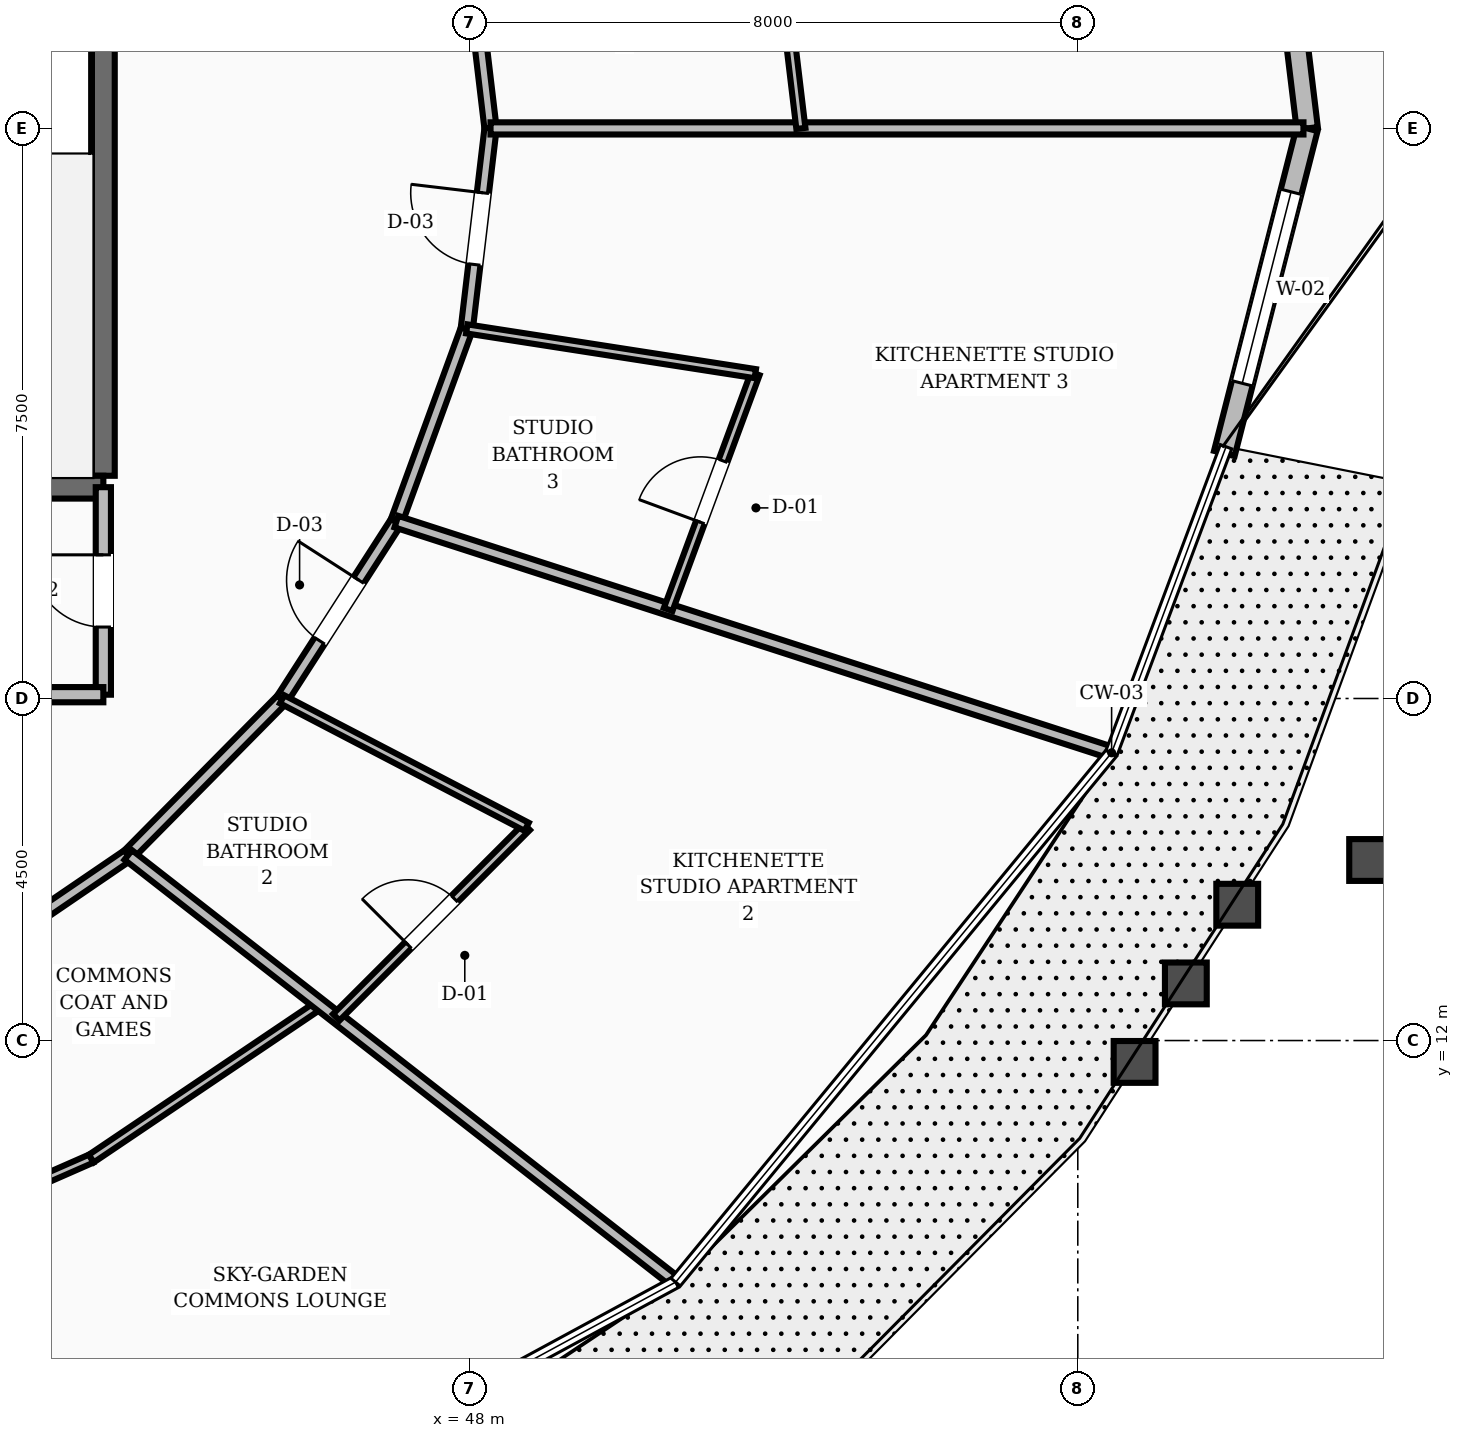
"""IFC4 building model, lengths in metres.
Left out: names, types, materials, properties, quantities, classifications, styles, units other than length and angle.
Written with IfcOpenShell. Run it as: python <this file> out.ifc"""

import sys

from ifc_helpers import new_model, si_unit, direction, frame, frame_2d, origin, place, context, subcontext, project, spatial, rectangle, extrude, element, fill, save


model = new_model("IFC4")
c1 = context("Model", 3, precision=1e-05, world=origin(), true_north=direction((0.0, 1.0)))
c2 = subcontext(c1, "Body", "Model", "MODEL_VIEW")
j1 = project(units=[si_unit("LENGTHUNIT", "METRE"), si_unit("PLANEANGLEUNIT", "RADIAN")], contexts=[c1])
p1 = place(None, origin())
s1 = spatial("IfcSite", under=j1, at=p1, CompositionType="ELEMENT")
p2 = place(p1, origin())
s2 = spatial("IfcBuilding", under=s1, at=p2, CompositionType="ELEMENT")
p3 = place(p2, frame((0.0, 0.0, 84.4)))
s3 = spatial("IfcBuildingStorey", under=s2, at=p3, CompositionType="ELEMENT", Elevation=84.4)
p4 = place(p3, frame((43.18, 19.43, 0.0), z_axis=(0.0, 0.0, 1.0), x_axis=(0.0, 1.0, 0.0)))
e1 = element("IfcWall", 1, at=p4, inside=s3, PredefinedType="SHEAR", context=c2, shape_type="SweptSolid", body=[
    extrude(rectangle(XDim=8.74, YDim=0.3, at=frame_2d((4.37, 0.0))), origin(), (0.0, 0.0, 1.0), 3.6),
])
p5 = place(p3, frame((39.58, 19.28, 0.0), z_axis=(0.0, 0.0, 1.0), x_axis=(1.0, 0.0, 0.0)))
e2 = element("IfcWall", 2, at=p5, inside=s3, PredefinedType="SHEAR", context=c2, shape_type="SweptSolid", body=[
    extrude(rectangle(XDim=3.6, YDim=0.3, at=frame_2d((1.8, 0.0))), origin(), (0.0, 0.0, 1.0), 3.6),
])
p6 = place(p3, frame((59.019, 24.0, 0.0), z_axis=(0.0, 0.0, 1.0), x_axis=(-0.119979283707, 0.99277639551, 0.0)))
e3 = element("IfcWall", 3, at=p6, inside=s3, PredefinedType="STANDARD", context=c2, shape_type="SweptSolid", body=[
    extrude(rectangle(XDim=4.328, YDim=0.28, at=frame_2d((2.164, 0.0))), origin(), (0.0, 0.0, 1.0), 2.71),
])
p7 = place(p3, frame((57.928, 19.723, 0.0), z_axis=(0.0, 0.0, 1.0), x_axis=(0.24719210279, 0.968966492877, 0.0)))
e4 = element("IfcWall", 4, at=p7, inside=s3, PredefinedType="STANDARD", context=c2, shape_type="SweptSolid", body=[
    extrude(rectangle(XDim=4.414, YDim=0.28, at=frame_2d((2.207, 0.0))), origin(), (0.0, 0.0, 1.0), 2.71),
])
p8 = place(p7, frame((0.953, 0.0, 0.8)))
e5 = element("IfcOpeningElement", 5, at=p8, cuts=e4, PredefinedType="OPENING", context=c2, shape_type="SweptSolid", body=[
    extrude(rectangle(XDim=2.6, YDim=1.65, at=frame_2d((1.3, 0.825))), frame((0.0, 0.15, 0.0), z_axis=(0.0, -1.0, 0.0), x_axis=(1.0, 0.0, 0.0)), (0.0, 0.0, 1.0), 0.3),
])
p9 = place(p3, frame((43.18, 16.55, 0.0), z_axis=(0.0, 0.0, 1.0), x_axis=(0.0, 1.0, 0.0)))
e6 = element("IfcWall", 6, at=p9, inside=s3, PredefinedType="SOLIDWALL", context=c2, shape_type="SweptSolid", body=[
    extrude(rectangle(XDim=2.73, YDim=0.2, at=frame_2d((1.365, 0.0))), origin(), (0.0, 0.0, 1.0), 2.71),
])
p10 = place(p9, frame((0.89, 0.0, 0.0)))
e7 = element("IfcOpeningElement", 7, at=p10, cuts=e6, PredefinedType="OPENING", context=c2, shape_type="SweptSolid", body=[
    extrude(rectangle(XDim=0.95, YDim=2.1, at=frame_2d((0.475, 1.05))), frame((0.0, 0.11, 0.0), z_axis=(0.0, -1.0, 0.0), x_axis=(1.0, 0.0, 0.0)), (0.0, 0.0, 1.0), 0.22),
])
p11 = place(p3, frame((39.2, 16.55, 0.0), z_axis=(0.0, 0.0, 1.0), x_axis=(1.0, 0.0, 0.0)))
e8 = element("IfcWall", 8, at=p11, inside=s3, PredefinedType="SOLIDWALL", context=c2, shape_type="SweptSolid", body=[
    extrude(rectangle(XDim=3.98, YDim=0.2, at=frame_2d((1.99, 0.0))), origin(), (0.0, 0.0, 1.0), 2.71),
])
p12 = place(p3, frame((48.274, 24.0, 0.0), z_axis=(0.0, 0.0, 1.0), x_axis=(-0.117763961213, 0.99304161516, 0.0)))
e9 = element("IfcWall", 9, at=p12, inside=s3, PredefinedType="SOLIDWALL", context=c2, shape_type="SweptSolid", body=[
    extrude(rectangle(XDim=2.656, YDim=0.16, at=frame_2d((1.328, 0.0))), origin(), (0.0, 0.0, 1.0), 2.71),
])
p13 = place(p3, frame((41.041, 12.76, 0.0), z_axis=(0.0, 0.0, 1.0), x_axis=(0.826293096206, 0.56324037423, 0.0)))
e10 = element("IfcWall", 10, at=p13, inside=s3, PredefinedType="SOLIDWALL", context=c2, shape_type="SweptSolid", body=[
    extrude(rectangle(XDim=2.985, YDim=0.16, at=frame_2d((1.492, 0.0))), origin(), (0.0, 0.0, 1.0), 2.71),
])
p14 = place(p3, frame((43.508, 14.441, 0.0), z_axis=(0.0, 0.0, 1.0), x_axis=(0.702811997, 0.711375636969, 0.0)))
e11 = element("IfcWall", 11, at=p14, inside=s3, PredefinedType="SOLIDWALL", context=c2, shape_type="SweptSolid", body=[
    extrude(rectangle(XDim=2.879, YDim=0.16, at=frame_2d((1.44, 0.0))), origin(), (0.0, 0.0, 1.0), 2.71),
])
p15 = place(p3, frame((45.531, 16.49, 0.0), z_axis=(0.0, 0.0, 1.0), x_axis=(0.541126045017, 0.840941498206, 0.0)))
e12 = element("IfcWall", 12, at=p15, inside=s3, PredefinedType="SOLIDWALL", context=c2, shape_type="SweptSolid", body=[
    extrude(rectangle(XDim=2.779, YDim=0.16, at=frame_2d((1.39, 0.0))), origin(), (0.0, 0.0, 1.0), 2.71),
])
p16 = place(p15, frame((0.915, 0.0, 0.0)))
e13 = element("IfcOpeningElement", 13, at=p16, cuts=e12, PredefinedType="OPENING", context=c2, shape_type="SweptSolid", body=[
    extrude(rectangle(XDim=0.95, YDim=2.1, at=frame_2d((0.475, 1.05))), frame((0.0, 0.09, 0.0), z_axis=(0.0, -1.0, 0.0), x_axis=(1.0, 0.0, 0.0)), (0.0, 0.0, 1.0), 0.18),
])
p17 = place(p3, frame((47.035, 18.827, 0.0), z_axis=(0.0, 0.0, 1.0), x_axis=(0.343013437329, 0.939330496583, 0.0)))
e14 = element("IfcWall", 14, at=p17, inside=s3, PredefinedType="SOLIDWALL", context=c2, shape_type="SweptSolid", body=[
    extrude(rectangle(XDim=2.7, YDim=0.16, at=frame_2d((1.35, 0.0))), origin(), (0.0, 0.0, 1.0), 2.71),
])
p18 = place(p3, frame((47.961, 21.363, 0.0), z_axis=(0.0, 0.0, 1.0), x_axis=(0.117763961213, 0.99304161516, 0.0)))
e15 = element("IfcWall", 15, at=p18, inside=s3, PredefinedType="SOLIDWALL", context=c2, shape_type="SweptSolid", body=[
    extrude(rectangle(XDim=2.656, YDim=0.16, at=frame_2d((1.328, 0.0))), origin(), (0.0, 0.0, 1.0), 2.71),
])
p19 = place(p18, frame((0.853, 0.0, 0.0)))
e16 = element("IfcOpeningElement", 16, at=p19, cuts=e15, PredefinedType="OPENING", context=c2, shape_type="SweptSolid", body=[
    extrude(rectangle(XDim=0.95, YDim=2.1, at=frame_2d((0.475, 1.05))), frame((0.0, 0.09, 0.0), z_axis=(0.0, -1.0, 0.0), x_axis=(1.0, 0.0, 0.0)), (0.0, 0.0, 1.0), 0.18),
])
p20 = place(p3, frame((39.592, 8.941, 0.0), z_axis=(0.0, 0.0, 1.0), x_axis=(0.915581997154, 0.4021313299, 0.0)))
e17 = element("IfcWall", 17, at=p20, inside=s3, PredefinedType="PARTITIONING", context=c2, shape_type="SweptSolid", body=[
    extrude(rectangle(XDim=3.746, YDim=0.12, at=frame_2d((1.873, 0.0))), origin(), (0.0, 0.0, 1.0), 2.71),
])
p21 = place(p3, frame((43.022, 10.448, 0.0), z_axis=(0.0, 0.0, 1.0), x_axis=(0.829159228311, 0.559012499061, 0.0)))
e18 = element("IfcWall", 18, at=p21, inside=s3, PredefinedType="PARTITIONING", context=c2, shape_type="SweptSolid", body=[
    extrude(rectangle(XDim=3.626, YDim=0.12, at=frame_2d((1.813, 0.0))), origin(), (0.0, 0.0, 1.0), 2.71),
])
p22 = place(p3, frame((43.508, 14.441, 0.0), z_axis=(0.0, 0.0, 1.0), x_axis=(0.788383175701, -0.615184499375, 0.0)))
e19 = element("IfcWall", 19, at=p22, inside=s3, PredefinedType="SOLIDWALL", context=c2, shape_type="SweptSolid", body=[
    extrude(rectangle(XDim=9.085, YDim=0.16, at=frame_2d((4.542, 0.0))), origin(), (0.0, 0.0, 1.0), 2.71),
])
p23 = place(p3, frame((46.244, 12.306, 0.0), z_axis=(0.0, 0.0, 1.0), x_axis=(0.707003430705, 0.707210116565, 0.0)))
e20 = element("IfcWall", 20, at=p23, inside=s3, PredefinedType="PARTITIONING", context=c2, shape_type="SweptSolid", body=[
    extrude(rectangle(XDim=3.544, YDim=0.12, at=frame_2d((1.772, 0.0))), origin(), (0.0, 0.0, 1.0), 2.71),
])
p24 = place(p23, frame((1.342, 0.0, 0.0)))
e21 = element("IfcOpeningElement", 21, at=p24, cuts=e20, PredefinedType="OPENING", context=c2, shape_type="SweptSolid", body=[
    extrude(rectangle(XDim=0.86, YDim=2.1, at=frame_2d((0.43, 1.05))), frame((0.0, 0.07, 0.0), z_axis=(0.0, -1.0, 0.0), x_axis=(1.0, 0.0, 0.0)), (0.0, 0.0, 1.0), 0.14),
])
p25 = place(p3, frame((45.531, 16.49, 0.0), z_axis=(0.0, 0.0, 1.0), x_axis=(0.886738326297, -0.462271717366, 0.0)))
e22 = element("IfcWall", 22, at=p25, inside=s3, PredefinedType="PARTITIONING", context=c2, shape_type="SweptSolid", body=[
    extrude(rectangle(XDim=3.629, YDim=0.12, at=frame_2d((1.815, 0.0))), origin(), (0.0, 0.0, 1.0), 2.71),
])
p26 = place(p3, frame((47.035, 18.827, 0.0), z_axis=(0.0, 0.0, 1.0), x_axis=(0.951534464328, -0.307542132393, 0.0)))
e23 = element("IfcWall", 23, at=p26, inside=s3, PredefinedType="SOLIDWALL", context=c2, shape_type="SweptSolid", body=[
    extrude(rectangle(XDim=9.839, YDim=0.16, at=frame_2d((4.919, 0.0))), origin(), (0.0, 0.0, 1.0), 2.71),
])
p27 = place(p3, frame((50.611, 17.671, 0.0), z_axis=(0.0, 0.0, 1.0), x_axis=(0.346556958516, 0.938028930526, 0.0)))
e24 = element("IfcWall", 24, at=p27, inside=s3, PredefinedType="PARTITIONING", context=c2, shape_type="SweptSolid", body=[
    extrude(rectangle(XDim=3.308, YDim=0.12, at=frame_2d((1.654, 0.0))), origin(), (0.0, 0.0, 1.0), 2.71),
])
p28 = place(p27, frame((1.224, 0.0, 0.0)))
e25 = element("IfcOpeningElement", 25, at=p28, cuts=e24, PredefinedType="OPENING", context=c2, shape_type="SweptSolid", body=[
    extrude(rectangle(XDim=0.86, YDim=2.1, at=frame_2d((0.43, 1.05))), frame((0.0, 0.07, 0.0), z_axis=(0.0, -1.0, 0.0), x_axis=(1.0, 0.0, 0.0)), (0.0, 0.0, 1.0), 0.14),
])
p29 = place(p3, frame((47.961, 21.363, 0.0), z_axis=(0.0, 0.0, 1.0), x_axis=(0.988170250217, -0.153360870451, 0.0)))
e26 = element("IfcWall", 26, at=p29, inside=s3, PredefinedType="PARTITIONING", context=c2, shape_type="SweptSolid", body=[
    extrude(rectangle(XDim=3.841, YDim=0.12, at=frame_2d((1.921, 0.0))), origin(), (0.0, 0.0, 1.0), 2.71),
])
p30 = place(p3, frame((48.274, 24.0, 0.0), z_axis=(0.0, 0.0, 1.0), x_axis=(1.0, 0.0, 0.0)))
e27 = element("IfcWall", 27, at=p30, inside=s3, PredefinedType="SOLIDWALL", context=c2, shape_type="SweptSolid", body=[
    extrude(rectangle(XDim=10.695, YDim=0.16, at=frame_2d((5.348, 0.0))), origin(), (0.0, 0.0, 1.0), 2.71),
])
p31 = place(p3, frame((52.357, 24.0, 0.0), z_axis=(0.0, 0.0, 1.0), x_axis=(-0.118911209682, 0.992904891826, 0.0)))
e28 = element("IfcWall", 28, at=p31, inside=s3, PredefinedType="PARTITIONING", context=c2, shape_type="SweptSolid", body=[
    extrude(rectangle(XDim=3.291, YDim=0.12, at=frame_2d((1.646, 0.0))), origin(), (0.0, 0.0, 1.0), 2.71),
])
p32 = place(p31, frame((1.216, 0.0, 0.0)))
e29 = element("IfcOpeningElement", 29, at=p32, cuts=e28, PredefinedType="OPENING", context=c2, shape_type="SweptSolid", body=[
    extrude(rectangle(XDim=0.86, YDim=2.1, at=frame_2d((0.43, 1.05))), frame((0.0, 0.07, 0.0), z_axis=(0.0, -1.0, 0.0), x_axis=(1.0, 0.0, 0.0)), (0.0, 0.0, 1.0), 0.14),
])
p33 = place(p8, origin())
e30 = element("IfcWindow", 30, at=p33, inside=s3, PartitioningType="SINGLE_PANEL", PredefinedType="WINDOW", context=c2, shape_type="SweptSolid", body=[
    extrude(rectangle(XDim=2.6, YDim=1.65, at=frame_2d((1.3, 0.825))), frame((0.0, 0.03, 0.0), z_axis=(0.0, -1.0, 0.0), x_axis=(1.0, 0.0, 0.0)), (0.0, 0.0, 1.0), 0.06),
])
fill(e5, e30)
p34 = place(p10, origin())
e31 = element("IfcDoor", 31, at=p34, inside=s3, OperationType="SINGLE_SWING_RIGHT", PredefinedType="DOOR", context=c2, shape_type="SweptSolid", body=[
    extrude(rectangle(XDim=0.95, YDim=2.1, at=frame_2d((0.475, 1.05))), frame((0.0, 0.025, 0.0), z_axis=(0.0, -1.0, 0.0), x_axis=(1.0, 0.0, 0.0)), (0.0, 0.0, 1.0), 0.05),
])
fill(e7, e31)
p35 = place(p24, origin())
e32 = element("IfcDoor", 32, at=p35, inside=s3, OperationType="SINGLE_SWING_LEFT", PredefinedType="DOOR", context=c2, shape_type="SweptSolid", body=[
    extrude(rectangle(XDim=0.86, YDim=2.1, at=frame_2d((0.43, 1.05))), frame((0.0, 0.025, 0.0), z_axis=(0.0, -1.0, 0.0), x_axis=(1.0, 0.0, 0.0)), (0.0, 0.0, 1.0), 0.05),
])
fill(e21, e32)
p36 = place(p16, origin())
e33 = element("IfcDoor", 33, at=p36, inside=s3, OperationType="SINGLE_SWING_RIGHT", PredefinedType="DOOR", context=c2, shape_type="SweptSolid", body=[
    extrude(rectangle(XDim=0.95, YDim=2.1, at=frame_2d((0.475, 1.05))), frame((0.0, 0.025, 0.0), z_axis=(0.0, -1.0, 0.0), x_axis=(1.0, 0.0, 0.0)), (0.0, 0.0, 1.0), 0.05),
])
fill(e13, e33)
p37 = place(p28, origin())
e34 = element("IfcDoor", 34, at=p37, inside=s3, OperationType="SINGLE_SWING_LEFT", PredefinedType="DOOR", context=c2, shape_type="SweptSolid", body=[
    extrude(rectangle(XDim=0.86, YDim=2.1, at=frame_2d((0.43, 1.05))), frame((0.0, 0.025, 0.0), z_axis=(0.0, -1.0, 0.0), x_axis=(1.0, 0.0, 0.0)), (0.0, 0.0, 1.0), 0.05),
])
fill(e25, e34)
p38 = place(p19, origin())
e35 = element("IfcDoor", 35, at=p38, inside=s3, OperationType="SINGLE_SWING_RIGHT", PredefinedType="DOOR", context=c2, shape_type="SweptSolid", body=[
    extrude(rectangle(XDim=0.95, YDim=2.1, at=frame_2d((0.475, 1.05))), frame((0.0, 0.025, 0.0), z_axis=(0.0, -1.0, 0.0), x_axis=(1.0, 0.0, 0.0)), (0.0, 0.0, 1.0), 0.05),
])
fill(e16, e35)
save(model, sys.argv[1])
